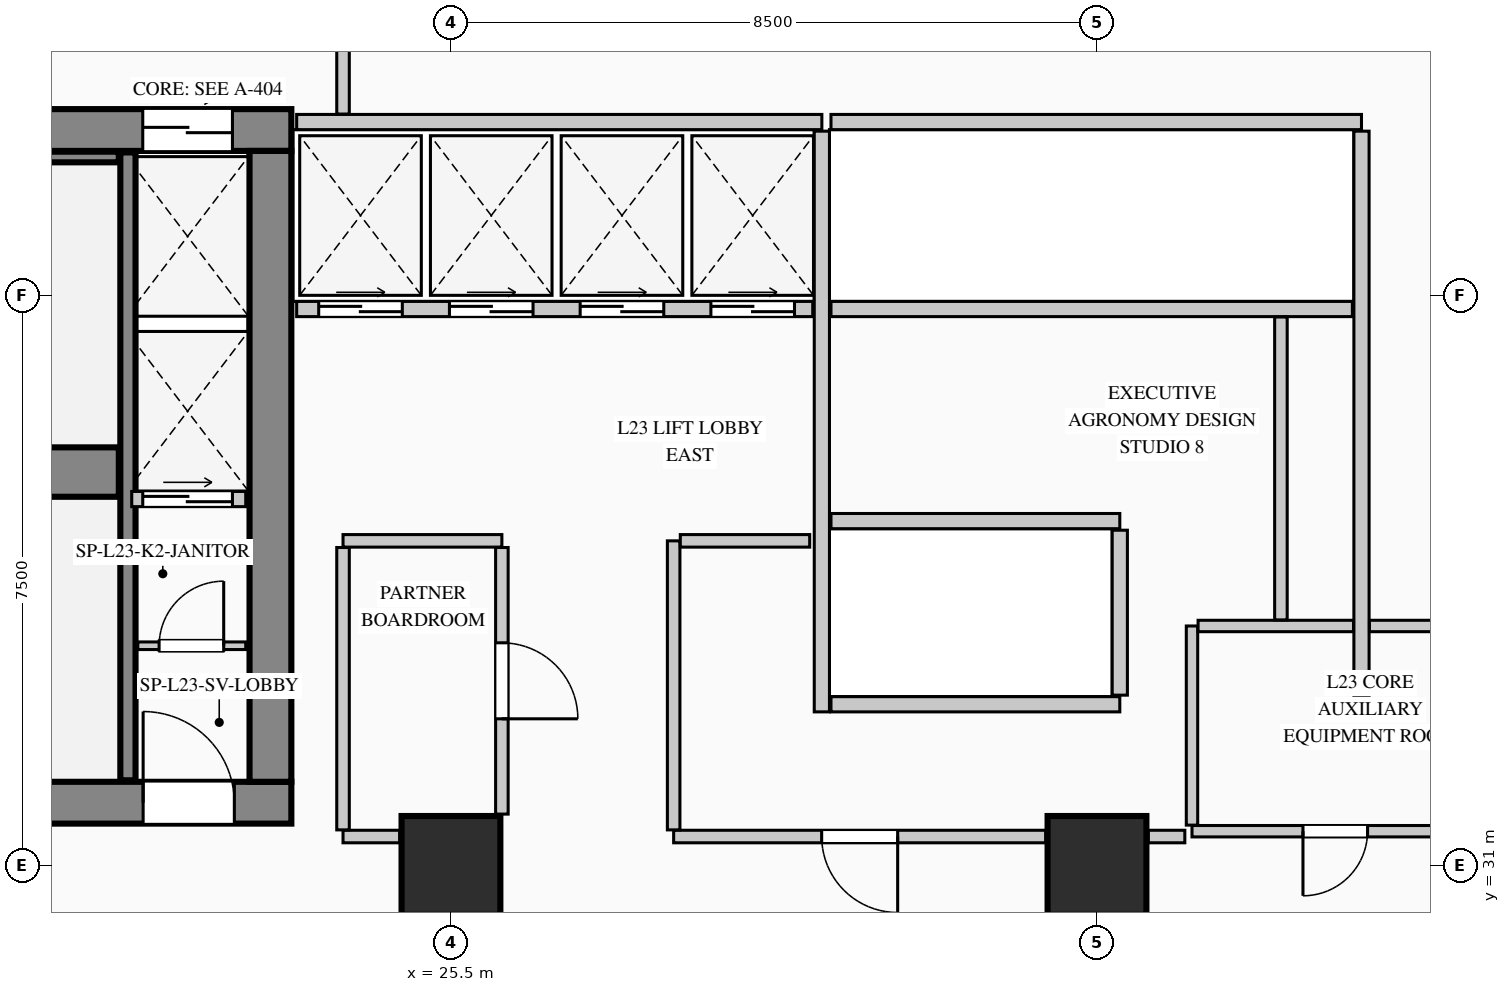
"""IFC4 building model, lengths in metres.
Left out: names, types, materials, properties, quantities, classifications, styles, units other than length and angle.
Written with IfcOpenShell. Run it as: python <this file> out.ifc"""

import sys

from ifc_helpers import new_model, si_unit, direction, frame, frame_2d, origin, origin_2d, place, context, subcontext, project, spatial, rectangle, extrude, element, fill, save


model = new_model("IFC4")
c1 = context("Model", 3, precision=1e-05, world=origin(), true_north=direction((0.0, 1.0)))
c2 = subcontext(c1, "Body", "Model", "MODEL_VIEW")
j1 = project(units=[si_unit("LENGTHUNIT", "METRE"), si_unit("PLANEANGLEUNIT", "RADIAN")], contexts=[c1])
p1 = place(None, origin())
s1 = spatial("IfcSite", under=j1, at=p1, CompositionType="ELEMENT")
p2 = place(p1, origin())
s2 = spatial("IfcBuilding", under=s1, at=p2, CompositionType="ELEMENT")
p3 = place(p2, frame((0.0, 0.0, 101.8)))
s3 = spatial("IfcBuildingStorey", under=s2, at=p3, CompositionType="ELEMENT", Elevation=101.8)
p4 = place(p3, frame((5.45, 40.675, 0.0), z_axis=(0.0, 0.0, 1.0), x_axis=(1.0, 0.0, 0.0)))
e1 = element("IfcWall", 1, at=p4, inside=s3, PredefinedType="SHEAR", context=c2, shape_type="SweptSolid", body=[
    extrude(rectangle(XDim=17.95, YDim=0.55, at=frame_2d((8.975, 0.0))), origin(), (0.0, 0.0, 1.0), 4.4),
])
p5 = place(p4, frame((15.995, 0.0, 0.0)))
e2 = element("IfcOpeningElement", 2, at=p5, cuts=e1, PredefinedType="OPENING", context=c2, shape_type="SweptSolid", body=[
    extrude(rectangle(XDim=1.18, YDim=2.25, at=frame_2d((0.59, 1.125))), frame((0.0, 0.285, 0.0), z_axis=(0.0, -1.0, 0.0), x_axis=(1.0, 0.0, 0.0)), (0.0, 0.0, 1.0), 0.57),
])
p6 = place(p3, frame((5.45, 31.825, 0.0), z_axis=(0.0, 0.0, 1.0), x_axis=(1.0, 0.0, 0.0)))
e3 = element("IfcWall", 3, at=p6, inside=s3, PredefinedType="SHEAR", context=c2, shape_type="SweptSolid", body=[
    extrude(rectangle(XDim=17.95, YDim=0.55, at=frame_2d((8.975, 0.0))), origin(), (0.0, 0.0, 1.0), 4.4),
])
p7 = place(p6, frame((3.2, 0.0, 0.0)))
e4 = element("IfcOpeningElement", 4, at=p7, cuts=e3, PredefinedType="OPENING", context=c2, shape_type="SweptSolid", body=[
    extrude(rectangle(XDim=1.2, YDim=2.2, at=frame_2d((0.6, 1.1))), frame((0.0, 0.285, 0.0), z_axis=(0.0, -1.0, 0.0), x_axis=(1.0, 0.0, 0.0)), (0.0, 0.0, 1.0), 0.57),
])
p8 = place(p6, frame((7.05, 0.0, 0.0)))
e5 = element("IfcOpeningElement", 5, at=p8, cuts=e3, PredefinedType="OPENING", context=c2, shape_type="SweptSolid", body=[
    extrude(rectangle(XDim=1.2, YDim=2.2, at=frame_2d((0.6, 1.1))), frame((0.0, 0.285, 0.0), z_axis=(0.0, -1.0, 0.0), x_axis=(1.0, 0.0, 0.0)), (0.0, 0.0, 1.0), 0.57),
])
p9 = place(p6, frame((8.9, 0.0, 0.0)))
e6 = element("IfcOpeningElement", 6, at=p9, cuts=e3, PredefinedType="OPENING", context=c2, shape_type="SweptSolid", body=[
    extrude(rectangle(XDim=1.15, YDim=2.2, at=frame_2d((0.575, 1.1))), frame((0.0, 0.285, 0.0), z_axis=(0.0, -1.0, 0.0), x_axis=(1.0, 0.0, 0.0)), (0.0, 0.0, 1.0), 0.57),
])
p10 = place(p6, frame((16.0, 0.0, 0.0)))
e7 = element("IfcOpeningElement", 7, at=p10, cuts=e3, PredefinedType="OPENING", context=c2, shape_type="SweptSolid", body=[
    extrude(rectangle(XDim=1.2, YDim=2.2, at=frame_2d((0.6, 1.1))), frame((0.0, 0.285, 0.0), z_axis=(0.0, -1.0, 0.0), x_axis=(1.0, 0.0, 0.0)), (0.0, 0.0, 1.0), 0.57),
])
p11 = place(p3, frame((23.125, 32.1, 0.0), z_axis=(0.0, 0.0, 1.0), x_axis=(0.0, 1.0, 0.0)))
e8 = element("IfcWall", 8, at=p11, inside=s3, PredefinedType="SHEAR", context=c2, shape_type="SweptSolid", body=[
    extrude(rectangle(XDim=8.3, YDim=0.55, at=frame_2d((4.15, 0.0))), origin(), (0.0, 0.0, 1.0), 4.4),
])
p12 = place(p3, frame((14.12, 36.175, 0.0), z_axis=(0.0, 0.0, 1.0), x_axis=(1.0, 0.0, 0.0)))
e9 = element("IfcWall", 9, at=p12, inside=s3, PredefinedType="SHEAR", context=c2, shape_type="SweptSolid", body=[
    extrude(rectangle(XDim=7.01, YDim=0.65, at=frame_2d((3.505, 0.0))), origin(), (0.0, 0.0, 1.0), 4.4),
])
p13 = place(p3, frame((21.25, 32.12, 0.0), z_axis=(0.0, 0.0, 1.0), x_axis=(0.0, 1.0, 0.0)))
e10 = element("IfcWall", 10, at=p13, inside=s3, PredefinedType="SHEAR", context=c2, shape_type="SweptSolid", body=[
    extrude(rectangle(XDim=8.26, YDim=0.2, at=frame_2d((4.13, 0.0))), origin(), (0.0, 0.0, 1.0), 4.4),
])
p14 = place(p3, frame((14.12, 40.32, 0.0), z_axis=(0.0, 0.0, 1.0), x_axis=(1.0, 0.0, 0.0)))
e11 = element("IfcWall", 11, at=p14, inside=s3, PredefinedType="SHEAR", context=c2, shape_type="SweptSolid", body=[
    extrude(rectangle(XDim=7.01, YDim=0.14, at=frame_2d((3.505, 0.0))), origin(), (0.0, 0.0, 1.0), 4.4),
])
for number, where, z_axis, x_axis in (
    (12, (25.5, 31.0, 0.0), (0.0, 0.0, 1.0), (1.0, 0.0, 0.0)),
    (13, (34.0, 31.0, 0.0), (0.0, 0.0, 1.0), (1.0, 0.0, 0.0)),
):
    element("IfcColumn", number, at=place(p3, frame(where, z_axis=z_axis, x_axis=x_axis)), inside=s3, PredefinedType="COLUMN", context=c2, shape_type="SweptSolid", body=[
        extrude(rectangle(XDim=1.3, YDim=1.3, at=origin_2d()), origin(), (0.0, 0.0, 1.0), 4.4),
    ])
p15 = place(p3, frame((21.38, 33.89, 0.0), z_axis=(0.0, 0.0, 1.0), x_axis=(1.0, 0.0, 0.0)))
e14 = element("IfcWall", 14, at=p15, inside=s3, PredefinedType="PARTITIONING", context=c2, shape_type="SweptSolid", body=[
    extrude(rectangle(XDim=1.42, YDim=0.1, at=frame_2d((0.71, 0.0))), origin(), (0.0, 0.0, 1.0), 4.05),
])
p16 = place(p15, frame((0.28, 0.0, 0.0)))
e15 = element("IfcOpeningElement", 15, at=p16, cuts=e14, PredefinedType="OPENING", context=c2, shape_type="SweptSolid", body=[
    extrude(rectangle(XDim=0.85, YDim=2.1, at=frame_2d((0.425, 1.05))), frame((0.0, 0.06, 0.0), z_axis=(0.0, -1.0, 0.0), x_axis=(1.0, 0.0, 0.0)), (0.0, 0.0, 1.0), 0.12),
])
p17 = place(p3, frame((21.3, 35.82, 0.0), z_axis=(0.0, 0.0, 1.0), x_axis=(1.0, 0.0, 0.0)))
e16 = element("IfcWall", 16, at=p17, inside=s3, PredefinedType="PARTITIONING", context=c2, shape_type="SweptSolid", body=[
    extrude(rectangle(XDim=1.5, YDim=0.2, at=frame_2d((0.75, 0.0))), origin(), (0.0, 0.0, 1.0), 4.05),
])
p18 = place(p17, frame((0.145, 0.0, 0.0)))
e17 = element("IfcOpeningElement", 17, at=p18, cuts=e16, PredefinedType="OPENING", context=c2, shape_type="SweptSolid", body=[
    extrude(rectangle(XDim=1.18, YDim=2.25, at=frame_2d((0.59, 1.125))), frame((0.0, 0.11, 0.0), z_axis=(0.0, -1.0, 0.0), x_axis=(1.0, 0.0, 0.0)), (0.0, 0.0, 1.0), 0.22),
])
p19 = place(p3, frame((23.47, 40.78, 0.0), z_axis=(0.0, 0.0, 1.0), x_axis=(1.0, 0.0, 0.0)))
e18 = element("IfcWall", 18, at=p19, inside=s3, PredefinedType="PARTITIONING", context=c2, shape_type="SweptSolid", body=[
    extrude(rectangle(XDim=6.91, YDim=0.2, at=frame_2d((3.455, 0.0))), origin(), (0.0, 0.0, 1.0), 4.05),
])
p20 = place(p3, frame((30.38, 33.02, 0.0), z_axis=(0.0, 0.0, 1.0), x_axis=(0.0, 1.0, 0.0)))
e19 = element("IfcWall", 19, at=p20, inside=s3, PredefinedType="PARTITIONING", context=c2, shape_type="SweptSolid", body=[
    extrude(rectangle(XDim=7.64, YDim=0.2, at=frame_2d((3.82, 0.0))), origin(), (0.0, 0.0, 1.0), 4.05),
])
p21 = place(p3, frame((23.47, 38.32, 0.0), z_axis=(0.0, 0.0, 1.0), x_axis=(1.0, 0.0, 0.0)))
e20 = element("IfcWall", 20, at=p21, inside=s3, PredefinedType="PARTITIONING", context=c2, shape_type="SweptSolid", body=[
    extrude(rectangle(XDim=6.79, YDim=0.2, at=frame_2d((3.395, 0.0))), origin(), (0.0, 0.0, 1.0), 4.05),
])
p22 = place(p21, frame((0.29, 0.0, 0.0)))
e21 = element("IfcOpeningElement", 21, at=p22, cuts=e20, PredefinedType="OPENING", context=c2, shape_type="SweptSolid", body=[
    extrude(rectangle(XDim=1.1, YDim=2.2, at=frame_2d((0.55, 1.1))), frame((0.0, 0.11, 0.0), z_axis=(0.0, -1.0, 0.0), x_axis=(1.0, 0.0, 0.0)), (0.0, 0.0, 1.0), 0.22),
])
p23 = place(p21, frame((2.01, 0.0, 0.0)))
e22 = element("IfcOpeningElement", 22, at=p23, cuts=e20, PredefinedType="OPENING", context=c2, shape_type="SweptSolid", body=[
    extrude(rectangle(XDim=1.1, YDim=2.2, at=frame_2d((0.55, 1.1))), frame((0.0, 0.11, 0.0), z_axis=(0.0, -1.0, 0.0), x_axis=(1.0, 0.0, 0.0)), (0.0, 0.0, 1.0), 0.22),
])
p24 = place(p21, frame((3.73, 0.0, 0.0)))
e23 = element("IfcOpeningElement", 23, at=p24, cuts=e20, PredefinedType="OPENING", context=c2, shape_type="SweptSolid", body=[
    extrude(rectangle(XDim=1.1, YDim=2.2, at=frame_2d((0.55, 1.1))), frame((0.0, 0.11, 0.0), z_axis=(0.0, -1.0, 0.0), x_axis=(1.0, 0.0, 0.0)), (0.0, 0.0, 1.0), 0.22),
])
p25 = place(p21, frame((5.45, 0.0, 0.0)))
e24 = element("IfcOpeningElement", 24, at=p25, cuts=e20, PredefinedType="OPENING", context=c2, shape_type="SweptSolid", body=[
    extrude(rectangle(XDim=1.1, YDim=2.2, at=frame_2d((0.55, 1.1))), frame((0.0, 0.11, 0.0), z_axis=(0.0, -1.0, 0.0), x_axis=(1.0, 0.0, 0.0)), (0.0, 0.0, 1.0), 0.22),
])
p26 = place(p3, frame((30.5, 40.78, 0.0), z_axis=(0.0, 0.0, 1.0), x_axis=(1.0, 0.0, 0.0)))
e25 = element("IfcWall", 25, at=p26, inside=s3, PredefinedType="PARTITIONING", context=c2, shape_type="SweptSolid", body=[
    extrude(rectangle(XDim=6.98, YDim=0.2, at=frame_2d((3.49, 0.0))), origin(), (0.0, 0.0, 1.0), 4.05),
])
p27 = place(p3, frame((37.48, 33.24, 0.0), z_axis=(0.0, 0.0, 1.0), x_axis=(0.0, 1.0, 0.0)))
e26 = element("IfcWall", 26, at=p27, inside=s3, PredefinedType="PARTITIONING", context=c2, shape_type="SweptSolid", body=[
    extrude(rectangle(XDim=7.42, YDim=0.2, at=frame_2d((3.71, 0.0))), origin(), (0.0, 0.0, 1.0), 4.05),
])
p28 = place(p3, frame((30.5, 38.32, 0.0), z_axis=(0.0, 0.0, 1.0), x_axis=(1.0, 0.0, 0.0)))
e27 = element("IfcWall", 27, at=p28, inside=s3, PredefinedType="PARTITIONING", context=c2, shape_type="SweptSolid", body=[
    extrude(rectangle(XDim=6.86, YDim=0.2, at=frame_2d((3.43, 0.0))), origin(), (0.0, 0.0, 1.0), 4.05),
])
for number, where, z_axis, x_axis in (
    (28, (30.5, 35.53, 0.0), (0.0, 0.0, 1.0), (1.0, 0.0, 0.0)),
    (29, (30.5, 33.12, 0.0), (0.0, 0.0, 1.0), (1.0, 0.0, 0.0)),
):
    element("IfcWall", number, at=place(p3, frame(where, z_axis=z_axis, x_axis=x_axis)), inside=s3, PredefinedType="PARTITIONING", context=c2, shape_type="SweptSolid", body=[
        extrude(rectangle(XDim=3.8, YDim=0.2, at=frame_2d((1.9, 0.0))), origin(), (0.0, 0.0, 1.0), 4.05),
    ])
p29 = place(p3, frame((34.3, 33.24, 0.0), z_axis=(0.0, 0.0, 1.0), x_axis=(0.0, 1.0, 0.0)))
e30 = element("IfcWall", 30, at=p29, inside=s3, PredefinedType="PARTITIONING", context=c2, shape_type="SweptSolid", body=[
    extrude(rectangle(XDim=2.17, YDim=0.2, at=frame_2d((1.085, 0.0))), origin(), (0.0, 0.0, 1.0), 4.05),
])
p30 = place(p3, frame((39.02, 31.45, 0.0), z_axis=(0.0, 0.0, 1.0), x_axis=(-1.0, 0.0, 0.0)))
e31 = element("IfcWall", 31, at=p30, inside=s3, PredefinedType="PARTITIONING", context=c2, shape_type="SweptSolid", body=[
    extrude(rectangle(XDim=3.77, YDim=0.15, at=frame_2d((1.885, 0.0))), origin(), (0.0, 0.0, 1.0), 4.05),
])
p31 = place(p30, frame((1.46, 0.0, 0.0)))
e32 = element("IfcOpeningElement", 32, at=p31, cuts=e31, PredefinedType="OPENING", context=c2, shape_type="SweptSolid", body=[
    extrude(rectangle(XDim=0.85, YDim=2.1, at=frame_2d((0.425, 1.05))), frame((0.0, 0.085, 0.0), z_axis=(0.0, -1.0, 0.0), x_axis=(1.0, 0.0, 0.0)), (0.0, 0.0, 1.0), 0.17),
])
p32 = place(p3, frame((35.25, 31.53, 0.0), z_axis=(0.0, 0.0, 1.0), x_axis=(0.0, 1.0, 0.0)))
e33 = element("IfcWall", 33, at=p32, inside=s3, PredefinedType="PARTITIONING", context=c2, shape_type="SweptSolid", body=[
    extrude(rectangle(XDim=2.62, YDim=0.15, at=frame_2d((1.31, 0.0))), origin(), (0.0, 0.0, 1.0), 4.05),
])
p33 = place(p3, frame((37.585, 34.15, 0.0), z_axis=(0.0, 0.0, 1.0), x_axis=(1.0, 0.0, 0.0)))
e34 = element("IfcWall", 34, at=p33, inside=s3, PredefinedType="PARTITIONING", context=c2, shape_type="SweptSolid", body=[
    extrude(rectangle(XDim=1.435, YDim=0.15, at=frame_2d((0.718, 0.0))), origin(), (0.0, 0.0, 1.0), 4.05),
])
p34 = place(p3, frame((35.33, 34.15, 0.0), z_axis=(0.0, 0.0, 1.0), x_axis=(1.0, 0.0, 0.0)))
e35 = element("IfcWall", 35, at=p34, inside=s3, PredefinedType="PARTITIONING", context=c2, shape_type="SweptSolid", body=[
    extrude(rectangle(XDim=2.045, YDim=0.15, at=frame_2d((1.022, 0.0))), origin(), (0.0, 0.0, 1.0), 4.05),
])
p35 = place(p3, frame((24.08, 35.27, 0.0), z_axis=(0.0, 0.0, 1.0), x_axis=(1.0, 0.0, 0.0)))
e36 = element("IfcWall", 36, at=p35, inside=s3, PredefinedType="PARTITIONING", context=c2, shape_type="SweptSolid", body=[
    extrude(rectangle(XDim=2.09, YDim=0.165, at=frame_2d((1.045, 0.0))), origin(), (0.0, 0.0, 1.0), 4.05),
])
p36 = place(p3, frame((26.17, 35.183, 0.0), z_axis=(0.0, 0.0, 1.0), x_axis=(0.0, -1.0, 0.0)))
e37 = element("IfcWall", 37, at=p36, inside=s3, PredefinedType="PARTITIONING", context=c2, shape_type="SweptSolid", body=[
    extrude(rectangle(XDim=3.508, YDim=0.165, at=frame_2d((1.754, 0.0))), origin(), (0.0, 0.0, 1.0), 4.05),
])
p37 = place(p36, frame((1.254, 0.0, 0.0)))
e38 = element("IfcOpeningElement", 38, at=p37, cuts=e37, PredefinedType="OPENING", context=c2, shape_type="SweptSolid", body=[
    extrude(rectangle(XDim=1.0, YDim=2.15, at=frame_2d((0.5, 1.075))), frame((0.0, 0.093, 0.0), z_axis=(0.0, -1.0, 0.0), x_axis=(1.0, 0.0, 0.0)), (0.0, 0.0, 1.0), 0.185),
])
p38 = place(p3, frame((24.825, 31.38, 0.0), z_axis=(0.0, 0.0, 1.0), x_axis=(-1.0, 0.0, 0.0)))
e39 = element("IfcWall", 39, at=p38, inside=s3, PredefinedType="PARTITIONING", context=c2, shape_type="SweptSolid", body=[
    extrude(rectangle(XDim=0.745, YDim=0.165, at=frame_2d((0.373, 0.0))), origin(), (0.0, 0.0, 1.0), 4.05),
])
p39 = place(p3, frame((24.08, 31.468, 0.0), z_axis=(0.0, 0.0, 1.0), x_axis=(0.0, 1.0, 0.0)))
e40 = element("IfcWall", 40, at=p39, inside=s3, PredefinedType="PARTITIONING", context=c2, shape_type="SweptSolid", body=[
    extrude(rectangle(XDim=3.715, YDim=0.165, at=frame_2d((1.857, 0.0))), origin(), (0.0, 0.0, 1.0), 4.05),
])
p40 = place(p3, frame((36.42, 38.215, 0.0), z_axis=(0.0, 0.0, 1.0), x_axis=(0.0, -1.0, 0.0)))
e41 = element("IfcWall", 41, at=p40, inside=s3, PredefinedType="PARTITIONING", context=c2, shape_type="SweptSolid", body=[
    extrude(rectangle(XDim=3.985, YDim=0.165, at=frame_2d((1.993, 0.0))), origin(), (0.0, 0.0, 1.0), 4.05),
])
p41 = place(p3, frame((35.156, 31.38, 0.0), z_axis=(0.0, 0.0, 1.0), x_axis=(-1.0, 0.0, 0.0)))
e42 = element("IfcWall", 42, at=p41, inside=s3, PredefinedType="PARTITIONING", context=c2, shape_type="SweptSolid", body=[
    extrude(rectangle(XDim=0.48, YDim=0.165, at=frame_2d((0.24, 0.0))), origin(), (0.0, 0.0, 1.0), 4.05),
])
p42 = place(p3, frame((33.325, 31.38, 0.0), z_axis=(0.0, 0.0, 1.0), x_axis=(-1.0, 0.0, 0.0)))
e43 = element("IfcWall", 43, at=p42, inside=s3, PredefinedType="PARTITIONING", context=c2, shape_type="SweptSolid", body=[
    extrude(rectangle(XDim=4.895, YDim=0.165, at=frame_2d((2.448, 0.0))), origin(), (0.0, 0.0, 1.0), 4.05),
])
p43 = place(p42, frame((1.948, 0.0, 0.0)))
e44 = element("IfcOpeningElement", 44, at=p43, cuts=e43, PredefinedType="OPENING", context=c2, shape_type="SweptSolid", body=[
    extrude(rectangle(XDim=1.0, YDim=2.15, at=frame_2d((0.5, 1.075))), frame((0.0, 0.093, 0.0), z_axis=(0.0, -1.0, 0.0), x_axis=(1.0, 0.0, 0.0)), (0.0, 0.0, 1.0), 0.185),
])
p44 = place(p3, frame((28.43, 31.468, 0.0), z_axis=(0.0, 0.0, 1.0), x_axis=(0.0, 1.0, 0.0)))
e45 = element("IfcWall", 45, at=p44, inside=s3, PredefinedType="PARTITIONING", context=c2, shape_type="SweptSolid", body=[
    extrude(rectangle(XDim=3.802, YDim=0.165, at=frame_2d((1.901, 0.0))), origin(), (0.0, 0.0, 1.0), 4.05),
])
p45 = place(p3, frame((28.518, 35.27, 0.0), z_axis=(0.0, 0.0, 1.0), x_axis=(1.0, 0.0, 0.0)))
e46 = element("IfcWall", 46, at=p45, inside=s3, PredefinedType="PARTITIONING", context=c2, shape_type="SweptSolid", body=[
    extrude(rectangle(XDim=1.702, YDim=0.165, at=frame_2d((0.851, 0.0))), origin(), (0.0, 0.0, 1.0), 4.05),
])
p46 = place(p3, frame((24.08, 40.885, 0.0), z_axis=(0.0, 0.0, 1.0), x_axis=(0.0, 1.0, 0.0)))
e47 = element("IfcWall", 47, at=p46, inside=s3, PredefinedType="PARTITIONING", context=c2, shape_type="SweptSolid", body=[
    extrude(rectangle(XDim=2.33, YDim=0.165, at=frame_2d((1.165, 0.0))), origin(), (0.0, 0.0, 1.0), 4.05),
])
p47 = place(p10, origin())
e48 = element("IfcDoor", 48, at=p47, inside=s3, OperationType="SINGLE_SWING_LEFT", PredefinedType="DOOR", context=c2, shape_type="SweptSolid", body=[
    extrude(rectangle(XDim=1.2, YDim=2.2, at=frame_2d((0.6, 1.1))), frame((0.0, 0.025, 0.0), z_axis=(0.0, -1.0, 0.0), x_axis=(1.0, 0.0, 0.0)), (0.0, 0.0, 1.0), 0.05),
])
fill(e7, e48)
p48 = place(p16, origin())
e49 = element("IfcDoor", 49, at=p48, inside=s3, OperationType="SINGLE_SWING_RIGHT", PredefinedType="DOOR", context=c2, shape_type="SweptSolid", body=[
    extrude(rectangle(XDim=0.85, YDim=2.1, at=frame_2d((0.425, 1.05))), frame((0.0, 0.025, 0.0), z_axis=(0.0, -1.0, 0.0), x_axis=(1.0, 0.0, 0.0)), (0.0, 0.0, 1.0), 0.05),
])
fill(e15, e49)
p49 = place(p5, origin())
e50 = element("IfcDoor", 50, at=p49, inside=s3, OperationType="DOUBLE_DOOR_SLIDING", PredefinedType="DOOR", context=c2, shape_type="SweptSolid", body=[
    extrude(rectangle(XDim=1.18, YDim=2.25, at=frame_2d((0.59, 1.125))), frame((0.0, 0.025, 0.0), z_axis=(0.0, -1.0, 0.0), x_axis=(1.0, 0.0, 0.0)), (0.0, 0.0, 1.0), 0.05),
])
fill(e2, e50)
p50 = place(p18, origin())
e51 = element("IfcDoor", 51, at=p50, inside=s3, OperationType="DOUBLE_DOOR_SLIDING", PredefinedType="DOOR", context=c2, shape_type="SweptSolid", body=[
    extrude(rectangle(XDim=1.18, YDim=2.25, at=frame_2d((0.59, 1.125))), frame((0.0, 0.025, 0.0), z_axis=(0.0, -1.0, 0.0), x_axis=(1.0, 0.0, 0.0)), (0.0, 0.0, 1.0), 0.05),
])
fill(e17, e51)
p51 = place(p22, origin())
e52 = element("IfcDoor", 52, at=p51, inside=s3, OperationType="DOUBLE_DOOR_SLIDING", PredefinedType="DOOR", context=c2, shape_type="SweptSolid", body=[
    extrude(rectangle(XDim=1.1, YDim=2.2, at=frame_2d((0.55, 1.1))), frame((0.0, 0.025, 0.0), z_axis=(0.0, -1.0, 0.0), x_axis=(1.0, 0.0, 0.0)), (0.0, 0.0, 1.0), 0.05),
])
fill(e21, e52)
p52 = place(p23, origin())
e53 = element("IfcDoor", 53, at=p52, inside=s3, OperationType="DOUBLE_DOOR_SLIDING", PredefinedType="DOOR", context=c2, shape_type="SweptSolid", body=[
    extrude(rectangle(XDim=1.1, YDim=2.2, at=frame_2d((0.55, 1.1))), frame((0.0, 0.025, 0.0), z_axis=(0.0, -1.0, 0.0), x_axis=(1.0, 0.0, 0.0)), (0.0, 0.0, 1.0), 0.05),
])
fill(e22, e53)
p53 = place(p24, origin())
e54 = element("IfcDoor", 54, at=p53, inside=s3, OperationType="DOUBLE_DOOR_SLIDING", PredefinedType="DOOR", context=c2, shape_type="SweptSolid", body=[
    extrude(rectangle(XDim=1.1, YDim=2.2, at=frame_2d((0.55, 1.1))), frame((0.0, 0.025, 0.0), z_axis=(0.0, -1.0, 0.0), x_axis=(1.0, 0.0, 0.0)), (0.0, 0.0, 1.0), 0.05),
])
fill(e23, e54)
p54 = place(p25, origin())
e55 = element("IfcDoor", 55, at=p54, inside=s3, OperationType="DOUBLE_DOOR_SLIDING", PredefinedType="DOOR", context=c2, shape_type="SweptSolid", body=[
    extrude(rectangle(XDim=1.1, YDim=2.2, at=frame_2d((0.55, 1.1))), frame((0.0, 0.025, 0.0), z_axis=(0.0, -1.0, 0.0), x_axis=(1.0, 0.0, 0.0)), (0.0, 0.0, 1.0), 0.05),
])
fill(e24, e55)
p55 = place(p31, origin())
e56 = element("IfcDoor", 56, at=p55, inside=s3, OperationType="SINGLE_SWING_RIGHT", PredefinedType="DOOR", context=c2, shape_type="SweptSolid", body=[
    extrude(rectangle(XDim=0.85, YDim=2.1, at=frame_2d((0.425, 1.05))), frame((0.0, 0.025, 0.0), z_axis=(0.0, -1.0, 0.0), x_axis=(1.0, 0.0, 0.0)), (0.0, 0.0, 1.0), 0.05),
])
fill(e32, e56)
p56 = place(p37, origin())
e57 = element("IfcDoor", 57, at=p56, inside=s3, OperationType="SINGLE_SWING_RIGHT", PredefinedType="DOOR", context=c2, shape_type="SweptSolid", body=[
    extrude(rectangle(XDim=1.0, YDim=2.15, at=frame_2d((0.5, 1.075))), frame((0.0, 0.025, 0.0), z_axis=(0.0, -1.0, 0.0), x_axis=(1.0, 0.0, 0.0)), (0.0, 0.0, 1.0), 0.05),
])
fill(e38, e57)
p57 = place(p43, origin())
e58 = element("IfcDoor", 58, at=p57, inside=s3, OperationType="SINGLE_SWING_LEFT", PredefinedType="DOOR", context=c2, shape_type="SweptSolid", body=[
    extrude(rectangle(XDim=1.0, YDim=2.15, at=frame_2d((0.5, 1.075))), frame((0.0, 0.025, 0.0), z_axis=(0.0, -1.0, 0.0), x_axis=(1.0, 0.0, 0.0)), (0.0, 0.0, 1.0), 0.05),
])
fill(e44, e58)
save(model, sys.argv[1])
